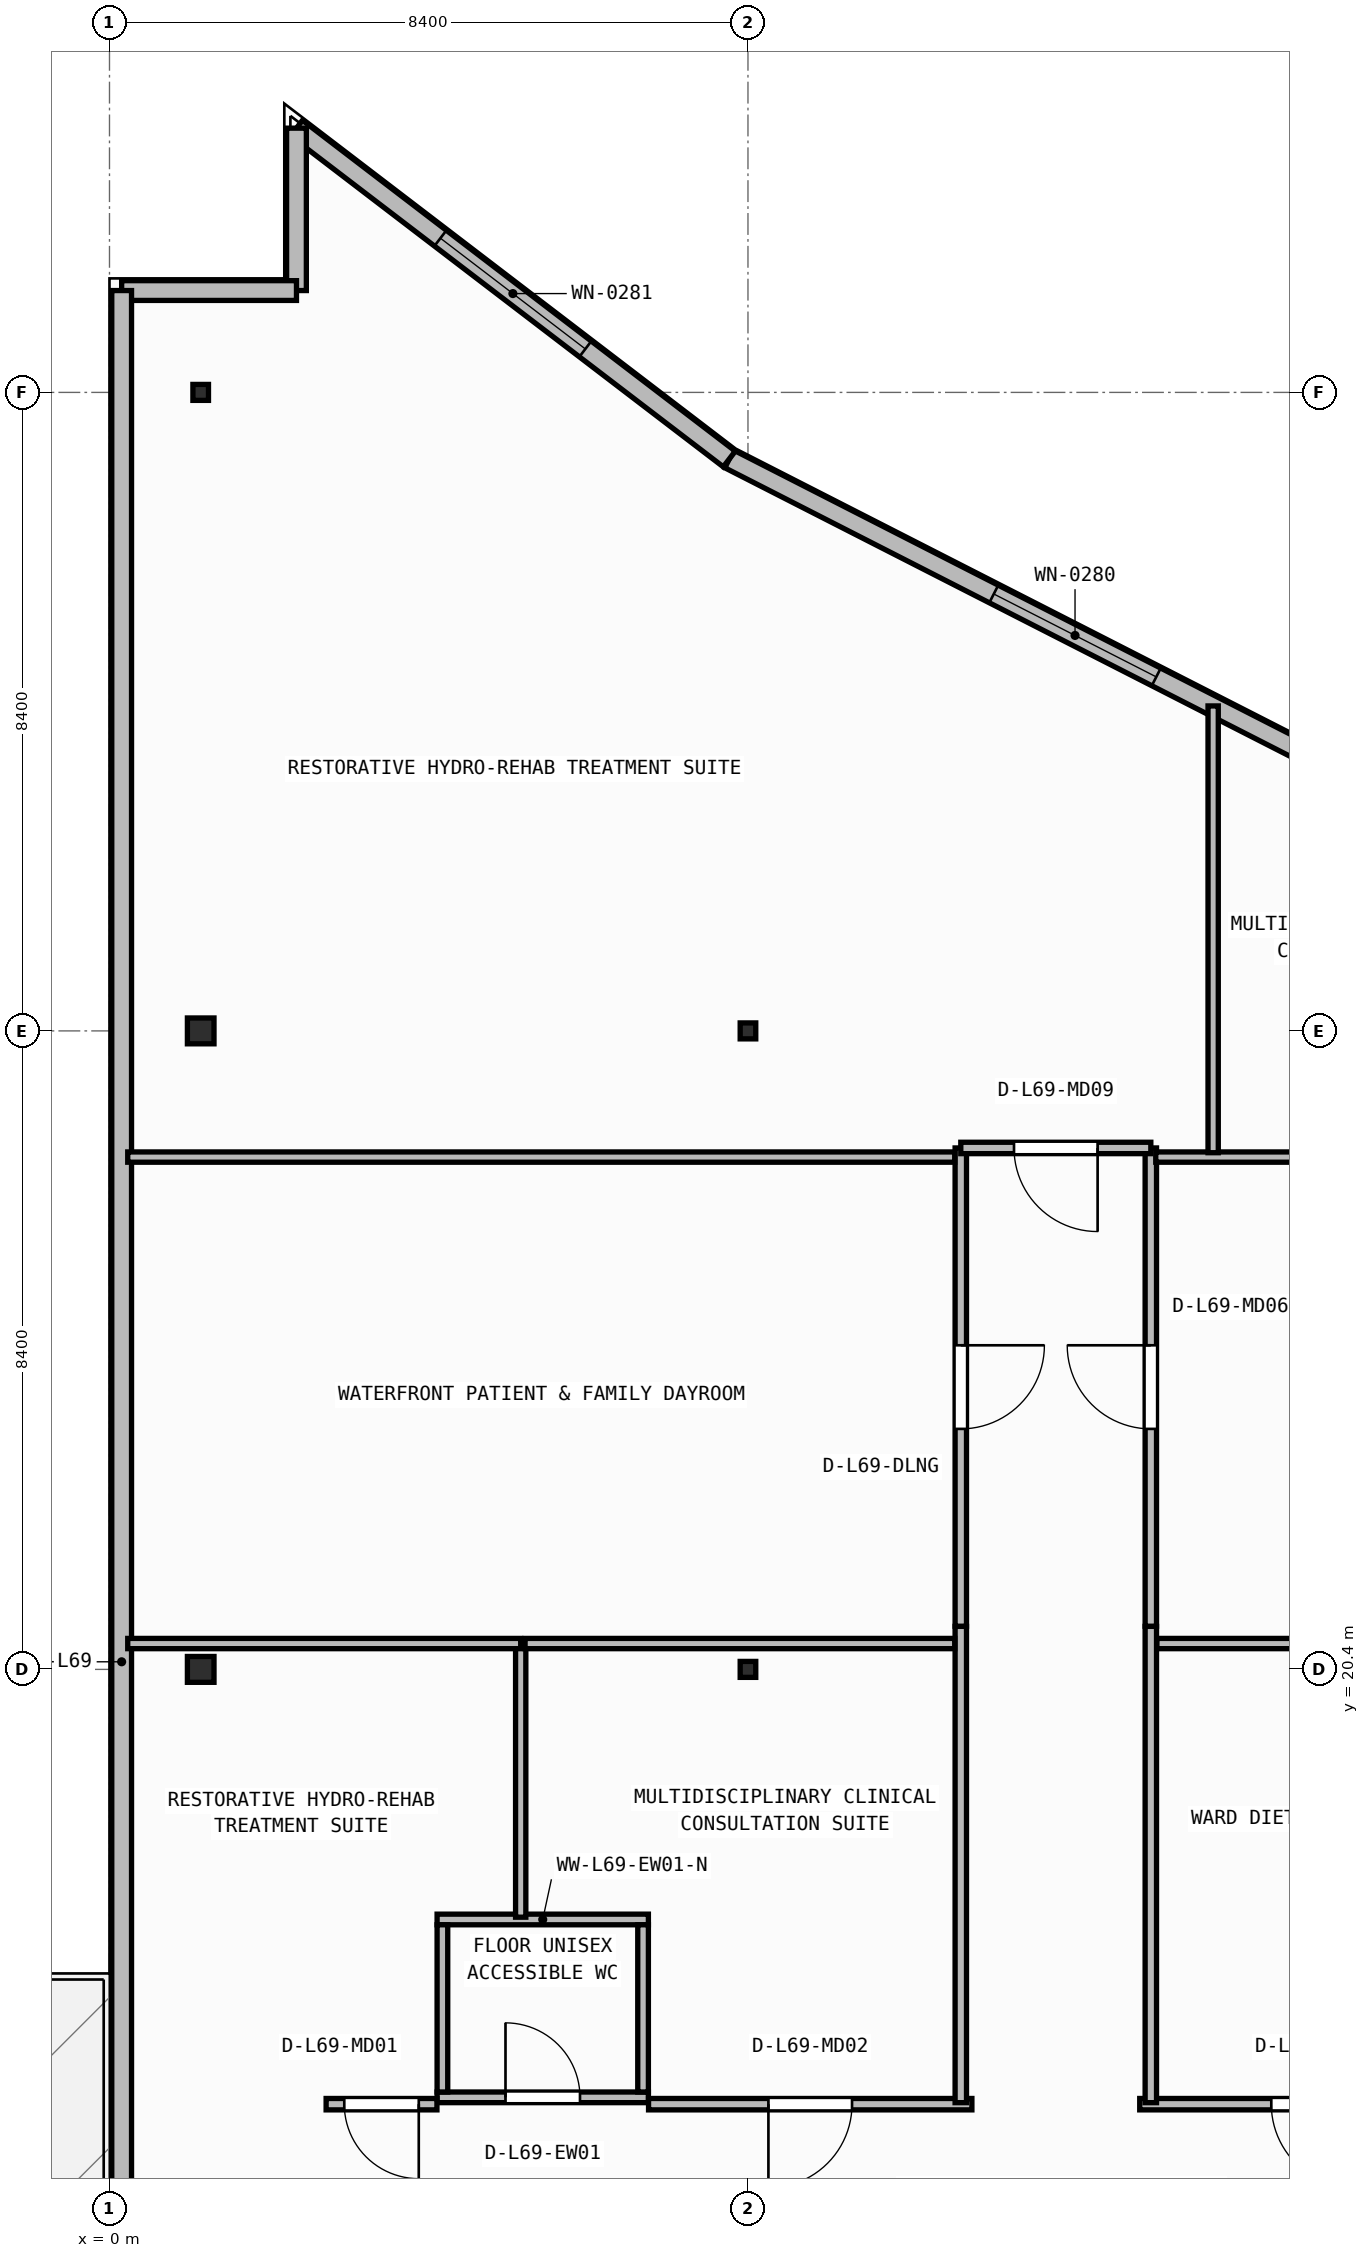
"""IFC4 building model, lengths in metres.
Left out: names, types, materials, properties, quantities, classifications, styles, units other than length and angle.
Written with IfcOpenShell. Run it as: python <this file> out.ifc"""

import sys

from ifc_helpers import new_model, si_unit, direction, frame, frame_2d, origin, origin_2d, place, context, subcontext, project, spatial, rectangle, i_section, extrude, element, fill, save


model = new_model("IFC4")
c1 = context("Model", 3, precision=1e-05, world=origin(), true_north=direction((0.0, 1.0)))
c2 = subcontext(c1, "Body", "Model", "MODEL_VIEW")
j1 = project(units=[si_unit("LENGTHUNIT", "METRE"), si_unit("PLANEANGLEUNIT", "RADIAN")], contexts=[c1])
p1 = place(None, origin())
s1 = spatial("IfcSite", under=j1, at=p1, CompositionType="ELEMENT")
p2 = place(p1, origin())
s2 = spatial("IfcBuilding", under=s1, at=p2, CompositionType="ELEMENT")
p3 = place(p2, frame((0.0, 0.0, 280.25)))
s3 = spatial("IfcBuildingStorey", under=s2, at=p3, CompositionType="ELEMENT", Elevation=280.25)
p4 = place(p3, frame((1.2, 20.4, 0.0), z_axis=(0.0, 0.0, 1.0), x_axis=(1.0, 0.0, 0.0)))
e1 = element("IfcColumn", 1, at=p4, inside=s3, PredefinedType="COLUMN", context=c2, shape_type="SweptSolid", body=[
    extrude(i_section(OverallWidth=0.35, OverallDepth=0.34, WebThickness=0.016, FlangeThickness=0.028, at=origin_2d()), origin(), (0.0, 0.0, 1.0), 3.95),
])
p5 = place(p3, frame((8.4, 20.4, 0.0), z_axis=(0.0, 0.0, 1.0), x_axis=(1.0, 0.0, 0.0)))
e2 = element("IfcColumn", 2, at=p5, inside=s3, PredefinedType="COLUMN", context=c2, shape_type="SweptSolid", body=[
    extrude(i_section(OverallWidth=0.205, OverallDepth=0.21, WebThickness=0.009, FlangeThickness=0.014, FilletRadius=0.011, at=origin_2d()), origin(), (0.0, 0.0, 1.0), 3.95),
])
p6 = place(p3, frame((1.2, 28.8, 0.0), z_axis=(0.0, 0.0, 1.0), x_axis=(1.0, 0.0, 0.0)))
e3 = element("IfcColumn", 3, at=p6, inside=s3, PredefinedType="COLUMN", context=c2, shape_type="SweptSolid", body=[
    extrude(i_section(OverallWidth=0.35, OverallDepth=0.34, WebThickness=0.016, FlangeThickness=0.028, at=origin_2d()), origin(), (0.0, 0.0, 1.0), 3.95),
])
for number, where, z_axis, x_axis in (
    (4, (8.4, 28.8, 0.0), (0.0, 0.0, 1.0), (1.0, 0.0, 0.0)),
    (5, (1.2, 37.2, 0.0), (0.0, 0.0, 1.0), (1.0, 0.0, 0.0)),
):
    element("IfcColumn", number, at=place(p3, frame(where, z_axis=z_axis, x_axis=x_axis)), inside=s3, PredefinedType="COLUMN", context=c2, shape_type="SweptSolid", body=[
        extrude(i_section(OverallWidth=0.205, OverallDepth=0.21, WebThickness=0.009, FlangeThickness=0.014, FilletRadius=0.011, at=origin_2d()), origin(), (0.0, 0.0, 1.0), 3.95),
    ])
p7 = place(p3, frame((17.251, 31.681, 0.0), z_axis=(0.0, 0.0, 1.0), x_axis=(-0.89069629535, 0.454598844532, 0.0)))
e6 = element("IfcWall", 6, at=p7, inside=s3, PredefinedType="STANDARD", context=c2, shape_type="SweptSolid", body=[
    extrude(rectangle(XDim=10.214, YDim=0.26, at=frame_2d((5.107, 0.0))), origin(), (0.0, 0.0, 1.0), 3.71),
])
p8 = place(p7, frame((3.907, 0.0, 0.9)))
e7 = element("IfcOpeningElement", 7, at=p8, cuts=e6, PredefinedType="OPENING", context=c2, shape_type="SweptSolid", body=[
    extrude(rectangle(XDim=2.4, YDim=1.65, at=frame_2d((1.2, 0.825))), frame((0.0, 0.14, 0.0), z_axis=(0.0, -1.0, 0.0), x_axis=(1.0, 0.0, 0.0)), (0.0, 0.0, 1.0), 0.28),
])
p9 = place(p3, frame((8.154, 36.324, 0.0), z_axis=(0.0, 0.0, 1.0), x_axis=(-0.794522176632, 0.607235136368, 0.0)))
e8 = element("IfcWall", 8, at=p9, inside=s3, PredefinedType="STANDARD", context=c2, shape_type="SweptSolid", body=[
    extrude(rectangle(XDim=7.167, YDim=0.26, at=frame_2d((3.583, 0.0))), origin(), (0.0, 0.0, 1.0), 3.71),
])
p10 = place(p9, frame((2.384, 0.0, 0.9)))
e9 = element("IfcOpeningElement", 9, at=p10, cuts=e8, PredefinedType="OPENING", context=c2, shape_type="SweptSolid", body=[
    extrude(rectangle(XDim=2.4, YDim=1.65, at=frame_2d((1.2, 0.825))), frame((0.0, 0.14, 0.0), z_axis=(0.0, -1.0, 0.0), x_axis=(1.0, 0.0, 0.0)), (0.0, 0.0, 1.0), 0.28),
])
p11 = place(p3, frame((2.46, 40.676, 0.0), z_axis=(0.0, 0.0, 1.0), x_axis=(0.0, -1.0, 0.0)))
e10 = element("IfcWall", 10, at=p11, inside=s3, PredefinedType="STANDARD", context=c2, shape_type="SweptSolid", body=[
    extrude(rectangle(XDim=2.136, YDim=0.26, at=frame_2d((1.068, 0.0))), origin(), (0.0, 0.0, 1.0), 3.71),
])
p12 = place(p3, frame((2.46, 38.54, 0.0), z_axis=(0.0, 0.0, 1.0), x_axis=(-1.0, 0.0, 0.0)))
e11 = element("IfcWall", 11, at=p12, inside=s3, PredefinedType="STANDARD", context=c2, shape_type="SweptSolid", body=[
    extrude(rectangle(XDim=2.3, YDim=0.26, at=frame_2d((1.15, 0.0))), origin(), (0.0, 0.0, 1.0), 3.71),
])
p13 = place(p3, frame((0.16, 38.54, 0.0), z_axis=(0.0, 0.0, 1.0), x_axis=(0.0, -1.0, 0.0)))
e12 = element("IfcWall", 12, at=p13, inside=s3, PredefinedType="STANDARD", context=c2, shape_type="SweptSolid", body=[
    extrude(rectangle(XDim=36.08, YDim=0.26, at=frame_2d((18.04, 0.0))), origin(), (0.0, 0.0, 1.0), 3.71),
])
p14 = place(p13, frame((28.414, 0.0, 0.0)))
e13 = element("IfcOpeningElement", 13, at=p14, cuts=e12, PredefinedType="OPENING", context=c2, shape_type="SweptSolid", body=[
    extrude(rectangle(XDim=1.3, YDim=2.15, at=frame_2d((0.65, 1.075))), frame((0.0, 0.14, 0.0), z_axis=(0.0, -1.0, 0.0), x_axis=(1.0, 0.0, 0.0)), (0.0, 0.0, 1.0), 0.28),
])
p15 = place(p3, frame((4.31, 14.77, 0.0), z_axis=(0.0, 0.0, 1.0), x_axis=(1.0, 0.0, 0.0)))
e14 = element("IfcWall", 14, at=p15, inside=s3, PredefinedType="PARTITIONING", context=c2, shape_type="SweptSolid", body=[
    extrude(rectangle(XDim=2.78, YDim=0.14, at=frame_2d((1.39, 0.0))), origin(), (0.0, 0.0, 1.0), 3.71),
])
p16 = place(p15, frame((0.9, 0.0, 0.0)))
e15 = element("IfcOpeningElement", 15, at=p16, cuts=e14, PredefinedType="OPENING", context=c2, shape_type="SweptSolid", body=[
    extrude(rectangle(XDim=0.98, YDim=2.1, at=frame_2d((0.49, 1.05))), frame((0.0, 0.08, 0.0), z_axis=(0.0, -1.0, 0.0), x_axis=(1.0, 0.0, 0.0)), (0.0, 0.0, 1.0), 0.16),
])
p17 = place(p3, frame((4.31, 17.11, 0.0), z_axis=(0.0, 0.0, 1.0), x_axis=(1.0, 0.0, 0.0)))
e16 = element("IfcWall", 16, at=p17, inside=s3, PredefinedType="PARTITIONING", context=c2, shape_type="SweptSolid", body=[
    extrude(rectangle(XDim=2.78, YDim=0.14, at=frame_2d((1.39, 0.0))), origin(), (0.0, 0.0, 1.0), 3.71),
])
for number, where, z_axis, x_axis in (
    (17, (4.38, 14.84, 0.0), (0.0, 0.0, 1.0), (0.0, 1.0, 0.0)),
    (18, (7.02, 14.84, 0.0), (0.0, 0.0, 1.0), (0.0, 1.0, 0.0)),
):
    element("IfcWall", number, at=place(p3, frame(where, z_axis=z_axis, x_axis=x_axis)), inside=s3, PredefinedType="PARTITIONING", context=c2, shape_type="SweptSolid", body=[
        extrude(rectangle(XDim=2.2, YDim=0.14, at=frame_2d((1.1, 0.0))), origin(), (0.0, 0.0, 1.0), 3.71),
    ])
p18 = place(p3, frame((4.308, 14.68, 0.0), z_axis=(0.0, 0.0, 1.0), x_axis=(-1.0, 0.0, 0.0)))
e19 = element("IfcWall", 19, at=p18, inside=s3, PredefinedType="PARTITIONING", context=c2, shape_type="SweptSolid", body=[
    extrude(rectangle(XDim=1.458, YDim=0.15, at=frame_2d((0.729, 0.0))), origin(), (0.0, 0.0, 1.0), 3.71),
])
p19 = place(p18, frame((0.239, 0.0, 0.0)))
e20 = element("IfcOpeningElement", 20, at=p19, cuts=e19, PredefinedType="OPENING", context=c2, shape_type="SweptSolid", body=[
    extrude(rectangle(XDim=0.98, YDim=2.1, at=frame_2d((0.49, 1.05))), frame((0.0, 0.085, 0.0), z_axis=(0.0, -1.0, 0.0), x_axis=(1.0, 0.0, 0.0)), (0.0, 0.0, 1.0), 0.17),
])
p20 = place(p3, frame((11.346, 14.68, 0.0), z_axis=(0.0, 0.0, 1.0), x_axis=(-1.0, 0.0, 0.0)))
e21 = element("IfcWall", 21, at=p20, inside=s3, PredefinedType="PARTITIONING", context=c2, shape_type="SweptSolid", body=[
    extrude(rectangle(XDim=4.254, YDim=0.15, at=frame_2d((2.127, 0.0))), origin(), (0.0, 0.0, 1.0), 3.71),
])
p21 = place(p20, frame((1.577, 0.0, 0.0)))
e22 = element("IfcOpeningElement", 22, at=p21, cuts=e21, PredefinedType="OPENING", context=c2, shape_type="SweptSolid", body=[
    extrude(rectangle(XDim=1.1, YDim=2.1, at=frame_2d((0.55, 1.05))), frame((0.0, 0.085, 0.0), z_axis=(0.0, -1.0, 0.0), x_axis=(1.0, 0.0, 0.0)), (0.0, 0.0, 1.0), 0.17),
])
p22 = place(p3, frame((18.116, 14.68, 0.0), z_axis=(0.0, 0.0, 1.0), x_axis=(-1.0, 0.0, 0.0)))
e23 = element("IfcWall", 23, at=p22, inside=s3, PredefinedType="PARTITIONING", context=c2, shape_type="SweptSolid", body=[
    extrude(rectangle(XDim=4.562, YDim=0.15, at=frame_2d((2.281, 0.0))), origin(), (0.0, 0.0, 1.0), 3.71),
])
p23 = place(p22, frame((1.731, 0.0, 0.0)))
e24 = element("IfcOpeningElement", 24, at=p23, cuts=e23, PredefinedType="OPENING", context=c2, shape_type="SweptSolid", body=[
    extrude(rectangle(XDim=1.1, YDim=2.1, at=frame_2d((0.55, 1.05))), frame((0.0, 0.085, 0.0), z_axis=(0.0, -1.0, 0.0), x_axis=(1.0, 0.0, 0.0)), (0.0, 0.0, 1.0), 0.17),
])
for number, where, z_axis, x_axis in (
    (25, (11.2, 20.966, 0.0), (0.0, 0.0, 1.0), (0.0, -1.0, 0.0)),
    (26, (13.7, 14.7, 0.0), (0.0, 0.0, 1.0), (0.0, 1.0, 0.0)),
):
    element("IfcWall", number, at=place(p3, frame(where, z_axis=z_axis, x_axis=x_axis)), inside=s3, PredefinedType="PARTITIONING", context=c2, shape_type="SweptSolid", body=[
        extrude(rectangle(XDim=6.266, YDim=0.15, at=frame_2d((3.133, 0.0))), origin(), (0.0, 0.0, 1.0), 3.71),
    ])
p24 = place(p3, frame((11.2, 27.26, 0.0), z_axis=(0.0, 0.0, 1.0), x_axis=(0.0, -1.0, 0.0)))
e27 = element("IfcWall", 27, at=p24, inside=s3, PredefinedType="PARTITIONING", context=c2, shape_type="SweptSolid", body=[
    extrude(rectangle(XDim=6.292, YDim=0.15, at=frame_2d((3.146, 0.0))), origin(), (0.0, 0.0, 1.0), 3.71),
])
p25 = place(p24, frame((2.596, 0.0, 0.0)))
e28 = element("IfcOpeningElement", 28, at=p25, cuts=e27, PredefinedType="OPENING", context=c2, shape_type="SweptSolid", body=[
    extrude(rectangle(XDim=1.1, YDim=2.1, at=frame_2d((0.55, 1.05))), frame((0.0, 0.085, 0.0), z_axis=(0.0, -1.0, 0.0), x_axis=(1.0, 0.0, 0.0)), (0.0, 0.0, 1.0), 0.17),
])
p26 = place(p3, frame((13.7, 20.968, 0.0), z_axis=(0.0, 0.0, 1.0), x_axis=(0.0, 1.0, 0.0)))
e29 = element("IfcWall", 29, at=p26, inside=s3, PredefinedType="PARTITIONING", context=c2, shape_type="SweptSolid", body=[
    extrude(rectangle(XDim=6.292, YDim=0.15, at=frame_2d((3.146, 0.0))), origin(), (0.0, 0.0, 1.0), 3.71),
])
p27 = place(p26, frame((2.596, 0.0, 0.0)))
e30 = element("IfcOpeningElement", 30, at=p27, cuts=e29, PredefinedType="OPENING", context=c2, shape_type="SweptSolid", body=[
    extrude(rectangle(XDim=1.1, YDim=2.1, at=frame_2d((0.55, 1.05))), frame((0.0, 0.085, 0.0), z_axis=(0.0, -1.0, 0.0), x_axis=(1.0, 0.0, 0.0)), (0.0, 0.0, 1.0), 0.17),
])
p28 = place(p3, frame((13.7, 27.26, 0.0), z_axis=(0.0, 0.0, 1.0), x_axis=(-1.0, 0.0, 0.0)))
e31 = element("IfcWall", 31, at=p28, inside=s3, PredefinedType="PARTITIONING", context=c2, shape_type="SweptSolid", body=[
    extrude(rectangle(XDim=2.5, YDim=0.15, at=frame_2d((1.25, 0.0))), origin(), (0.0, 0.0, 1.0), 3.71),
])
p29 = place(p28, frame((0.7, 0.0, 0.0)))
e32 = element("IfcOpeningElement", 32, at=p29, cuts=e31, PredefinedType="OPENING", context=c2, shape_type="SweptSolid", body=[
    extrude(rectangle(XDim=1.1, YDim=2.1, at=frame_2d((0.55, 1.05))), frame((0.0, 0.085, 0.0), z_axis=(0.0, -1.0, 0.0), x_axis=(1.0, 0.0, 0.0)), (0.0, 0.0, 1.0), 0.17),
])
p30 = place(p3, frame((5.41, 17.14, 0.0), z_axis=(0.0, 0.0, 1.0), x_axis=(0.0, 1.0, 0.0)))
e33 = element("IfcWall", 33, at=p30, inside=s3, PredefinedType="PARTITIONING", context=c2, shape_type="SweptSolid", body=[
    extrude(rectangle(XDim=3.6, YDim=0.135, at=frame_2d((1.8, 0.0))), origin(), (0.0, 0.0, 1.0), 3.71),
])
p31 = place(p3, frame((5.41, 20.74, 0.0), z_axis=(0.0, 0.0, 1.0), x_axis=(-1.0, 0.0, 0.0)))
e34 = element("IfcWall", 34, at=p31, inside=s3, PredefinedType="PARTITIONING", context=c2, shape_type="SweptSolid", body=[
    extrude(rectangle(XDim=5.17, YDim=0.135, at=frame_2d((2.585, 0.0))), origin(), (0.0, 0.0, 1.0), 3.157),
])
p32 = place(p3, frame((11.12, 20.74, 0.0), z_axis=(0.0, 0.0, 1.0), x_axis=(-1.0, 0.0, 0.0)))
e35 = element("IfcWall", 35, at=p32, inside=s3, PredefinedType="PARTITIONING", context=c2, shape_type="SweptSolid", body=[
    extrude(rectangle(XDim=5.653, YDim=0.135, at=frame_2d((2.826, 0.0))), origin(), (0.0, 0.0, 1.0), 3.157),
])
p33 = place(p3, frame((17.89, 20.74, 0.0), z_axis=(0.0, 0.0, 1.0), x_axis=(-1.0, 0.0, 0.0)))
e36 = element("IfcWall", 36, at=p33, inside=s3, PredefinedType="PARTITIONING", context=c2, shape_type="SweptSolid", body=[
    extrude(rectangle(XDim=4.11, YDim=0.135, at=frame_2d((2.055, 0.0))), origin(), (0.0, 0.0, 1.0), 3.157),
])
p34 = place(p3, frame((11.12, 27.14, 0.0), z_axis=(0.0, 0.0, 1.0), x_axis=(-1.0, 0.0, 0.0)))
e37 = element("IfcWall", 37, at=p34, inside=s3, PredefinedType="PARTITIONING", context=c2, shape_type="SweptSolid", body=[
    extrude(rectangle(XDim=10.88, YDim=0.135, at=frame_2d((5.44, 0.0))), origin(), (0.0, 0.0, 1.0), 3.71),
])
p35 = place(p3, frame((20.748, 27.14, 0.0), z_axis=(0.0, 0.0, 1.0), x_axis=(-1.0, 0.0, 0.0)))
e38 = element("IfcWall", 38, at=p35, inside=s3, PredefinedType="PARTITIONING", context=c2, shape_type="SweptSolid", body=[
    extrude(rectangle(XDim=6.983, YDim=0.135, at=frame_2d((3.491, 0.0))), origin(), (0.0, 0.0, 1.0), 3.71),
])
p36 = place(p35, frame((0.337, 0.0, 0.0)))
e39 = element("IfcOpeningElement", 39, at=p36, cuts=e38, PredefinedType="OPENING", context=c2, shape_type="SweptSolid", body=[
    extrude(rectangle(XDim=1.1, YDim=2.1, at=frame_2d((0.55, 1.05))), frame((0.0, 0.077, 0.0), z_axis=(0.0, -1.0, 0.0), x_axis=(1.0, 0.0, 0.0)), (0.0, 0.0, 1.0), 0.155),
])
p37 = place(p3, frame((14.52, 27.198, 0.0), z_axis=(0.0, 0.0, 1.0), x_axis=(0.0, 1.0, 0.0)))
e40 = element("IfcWall", 40, at=p37, inside=s3, PredefinedType="PARTITIONING", context=c2, shape_type="SweptSolid", body=[
    extrude(rectangle(XDim=5.878, YDim=0.135, at=frame_2d((2.939, 0.0))), origin(), (0.0, 0.0, 1.0), 3.71),
])
p38 = place(p8, origin())
e41 = element("IfcWindow", 41, at=p38, inside=s3, PartitioningType="SINGLE_PANEL", PredefinedType="WINDOW", context=c2, shape_type="SweptSolid", body=[
    extrude(rectangle(XDim=2.4, YDim=1.65, at=frame_2d((1.2, 0.825))), frame((0.0, 0.03, 0.0), z_axis=(0.0, -1.0, 0.0), x_axis=(1.0, 0.0, 0.0)), (0.0, 0.0, 1.0), 0.06),
])
fill(e7, e41)
p39 = place(p10, origin())
e42 = element("IfcWindow", 42, at=p39, inside=s3, PartitioningType="SINGLE_PANEL", PredefinedType="WINDOW", context=c2, shape_type="SweptSolid", body=[
    extrude(rectangle(XDim=2.4, YDim=1.65, at=frame_2d((1.2, 0.825))), frame((0.0, 0.03, 0.0), z_axis=(0.0, -1.0, 0.0), x_axis=(1.0, 0.0, 0.0)), (0.0, 0.0, 1.0), 0.06),
])
fill(e9, e42)
p40 = place(p16, origin())
e43 = element("IfcDoor", 43, at=p40, inside=s3, OperationType="SINGLE_SWING_LEFT", PredefinedType="DOOR", context=c2, shape_type="SweptSolid", body=[
    extrude(rectangle(XDim=0.98, YDim=2.1, at=frame_2d((0.49, 1.05))), frame((0.0, 0.025, 0.0), z_axis=(0.0, -1.0, 0.0), x_axis=(1.0, 0.0, 0.0)), (0.0, 0.0, 1.0), 0.05),
])
fill(e15, e43)
p41 = place(p19, origin())
e44 = element("IfcDoor", 44, at=p41, inside=s3, OperationType="SINGLE_SWING_LEFT", PredefinedType="DOOR", context=c2, shape_type="SweptSolid", body=[
    extrude(rectangle(XDim=0.98, YDim=2.1, at=frame_2d((0.49, 1.05))), frame((0.0, 0.025, 0.0), z_axis=(0.0, -1.0, 0.0), x_axis=(1.0, 0.0, 0.0)), (0.0, 0.0, 1.0), 0.05),
])
fill(e20, e44)
p42 = place(p21, origin())
e45 = element("IfcDoor", 45, at=p42, inside=s3, OperationType="SINGLE_SWING_RIGHT", PredefinedType="DOOR", context=c2, shape_type="SweptSolid", body=[
    extrude(rectangle(XDim=1.1, YDim=2.1, at=frame_2d((0.55, 1.05))), frame((0.0, 0.025, 0.0), z_axis=(0.0, -1.0, 0.0), x_axis=(1.0, 0.0, 0.0)), (0.0, 0.0, 1.0), 0.05),
])
fill(e22, e45)
p43 = place(p23, origin())
e46 = element("IfcDoor", 46, at=p43, inside=s3, OperationType="SINGLE_SWING_LEFT", PredefinedType="DOOR", context=c2, shape_type="SweptSolid", body=[
    extrude(rectangle(XDim=1.1, YDim=2.1, at=frame_2d((0.55, 1.05))), frame((0.0, 0.025, 0.0), z_axis=(0.0, -1.0, 0.0), x_axis=(1.0, 0.0, 0.0)), (0.0, 0.0, 1.0), 0.05),
])
fill(e24, e46)
p44 = place(p25, origin())
e47 = element("IfcDoor", 47, at=p44, inside=s3, OperationType="SINGLE_SWING_LEFT", PredefinedType="DOOR", context=c2, shape_type="SweptSolid", body=[
    extrude(rectangle(XDim=1.1, YDim=2.1, at=frame_2d((0.55, 1.05))), frame((0.0, 0.025, 0.0), z_axis=(0.0, -1.0, 0.0), x_axis=(1.0, 0.0, 0.0)), (0.0, 0.0, 1.0), 0.05),
])
fill(e28, e47)
p45 = place(p27, origin())
e48 = element("IfcDoor", 48, at=p45, inside=s3, OperationType="SINGLE_SWING_RIGHT", PredefinedType="DOOR", context=c2, shape_type="SweptSolid", body=[
    extrude(rectangle(XDim=1.1, YDim=2.1, at=frame_2d((0.55, 1.05))), frame((0.0, 0.025, 0.0), z_axis=(0.0, -1.0, 0.0), x_axis=(1.0, 0.0, 0.0)), (0.0, 0.0, 1.0), 0.05),
])
fill(e30, e48)
p46 = place(p29, origin())
e49 = element("IfcDoor", 49, at=p46, inside=s3, OperationType="SINGLE_SWING_LEFT", PredefinedType="DOOR", context=c2, shape_type="SweptSolid", body=[
    extrude(rectangle(XDim=1.1, YDim=2.1, at=frame_2d((0.55, 1.05))), frame((0.0, 0.025, 0.0), z_axis=(0.0, -1.0, 0.0), x_axis=(1.0, 0.0, 0.0)), (0.0, 0.0, 1.0), 0.05),
])
fill(e32, e49)
save(model, sys.argv[1])
